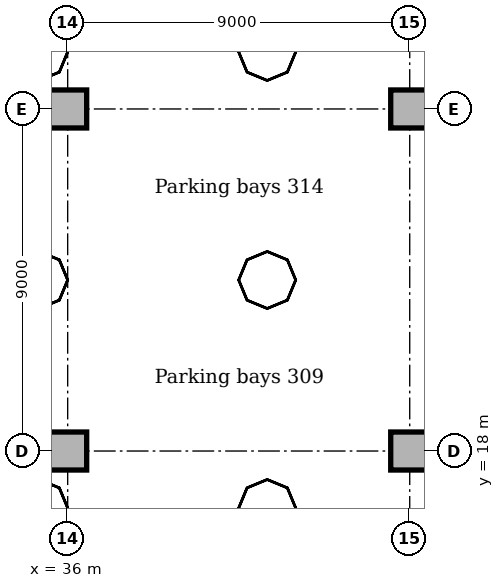
"""IFC4 building model, lengths in metres.
Left out: names, types, materials, properties, quantities, classifications, styles, units other than length and angle.
Written with IfcOpenShell. Run it as: python <this file> out.ifc"""

import sys

from ifc_helpers import new_model, si_unit, direction, frame, origin, origin_2d, place, context, subcontext, project, spatial, rectangle, extrude, element, save


model = new_model("IFC4")
c1 = context("Model", 3, precision=1e-05, world=origin(), true_north=direction((0.0, 1.0)))
c2 = subcontext(c1, "Body", "Model", "MODEL_VIEW")
j1 = project(units=[si_unit("LENGTHUNIT", "METRE"), si_unit("PLANEANGLEUNIT", "RADIAN")], contexts=[c1])
p1 = place(None, origin())
s1 = spatial("IfcSite", under=j1, at=p1, CompositionType="ELEMENT")
p2 = place(p1, origin())
s2 = spatial("IfcBuilding", under=s1, at=p2, CompositionType="ELEMENT")
p3 = place(p2, frame((0.0, 0.0, -14.0)))
s3 = spatial("IfcBuildingStorey", under=s2, at=p3, CompositionType="ELEMENT", Elevation=-14.0)
for number, where, z_axis, x_axis in (
    (1, (36.0, 18.0, 0.0), (0.0, 0.0, 1.0), (1.0, 0.0, 0.0)),
    (2, (36.0, 27.0, 0.0), (0.0, 0.0, 1.0), (1.0, 0.0, 0.0)),
    (3, (45.0, 18.0, 0.0), (0.0, 0.0, 1.0), (1.0, 0.0, 0.0)),
    (4, (45.0, 27.0, 0.0), (0.0, 0.0, 1.0), (1.0, 0.0, 0.0)),
):
    element("IfcColumn", number, at=place(p3, frame(where, z_axis=z_axis, x_axis=x_axis)), inside=s3, PredefinedType="COLUMN", context=c2, shape_type="SweptSolid", body=[
        extrude(rectangle(XDim=1.0, YDim=1.0, at=origin_2d()), origin(), (0.0, 0.0, 1.0), 4.15),
    ])
save(model, sys.argv[1])
